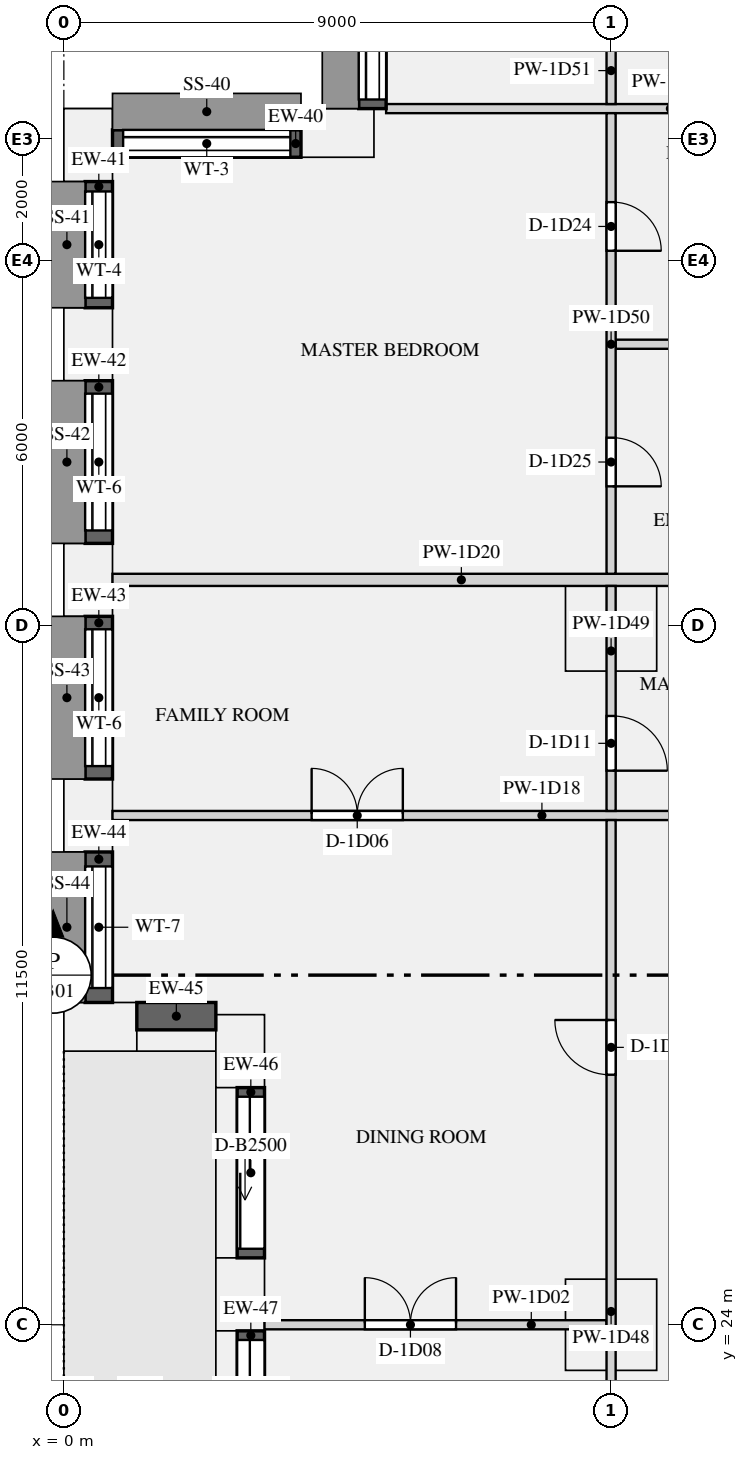
"""IFC4 building model, lengths in metres.
Left out: names, types, materials, properties, quantities, classifications, styles, units other than length and angle.
Written with IfcOpenShell. Run it as: python <this file> out.ifc"""

import sys

from ifc_helpers import new_model, si_unit, direction, frame, frame_2d, origin, origin_2d, place, context, subcontext, project, spatial, rectangle, extrude, element, fill, save


model = new_model("IFC4")
c1 = context("Model", 3, precision=1e-05, world=origin(), true_north=direction((0.0, 1.0)))
c2 = subcontext(c1, "Body", "Model", "MODEL_VIEW")
j1 = project(units=[si_unit("LENGTHUNIT", "METRE"), si_unit("PLANEANGLEUNIT", "RADIAN")], contexts=[c1])
p1 = place(None, origin())
s1 = spatial("IfcSite", under=j1, at=p1, CompositionType="ELEMENT")
p2 = place(p1, origin())
s2 = spatial("IfcBuilding", under=s1, at=p2, CompositionType="ELEMENT")
p3 = place(p2, frame((0.0, 0.0, 47.85)))
s3 = spatial("IfcBuildingStorey", under=s2, at=p3, CompositionType="ELEMENT", Elevation=47.85)
for number, where, z_axis, x_axis in (
    (1, (4.5, 43.6, 0.0), (0.0, 0.0, 1.0), (-1.0, 0.0, 0.0)),
    (2, (0.4, 43.4, 0.0), (0.0, 0.0, 1.0), (0.0, -1.0, 0.0)),
    (3, (0.4, 40.125, 0.0), (0.0, 0.0, 1.0), (0.0, -1.0, 0.0)),
    (4, (0.4, 36.25, 0.0), (0.0, 0.0, 1.0), (0.0, -1.0, 0.0)),
    (5, (0.4, 32.375, 0.0), (0.0, 0.0, 1.0), (0.0, -1.0, 0.0)),
    (6, (0.6, 28.9, 0.0), (0.0, 0.0, 1.0), (1.0, 0.0, 0.0)),
    (7, (2.9, 28.5, 0.0), (0.0, 0.0, 1.0), (0.0, -1.0, 0.0)),
    (8, (2.9, 24.5, 0.0), (0.0, 0.0, 1.0), (0.0, -1.0, 0.0)),
):
    element("IfcColumn", number, at=place(p3, frame(where, z_axis=z_axis, x_axis=x_axis)), inside=s3, PredefinedType="USERDEFINED", context=c2, shape_type="SweptSolid", body=[
        extrude(rectangle(XDim=1.2, YDim=0.8, at=origin_2d()), origin(), (0.0, 0.0, 1.0), 3.15),
    ])
for number, where, z_axis, x_axis in (
    (9, (9.0, 24.0, 0.0), (0.0, 0.0, 1.0), (1.0, 0.0, 0.0)),
    (10, (9.0, 35.5, 0.0), (0.0, 0.0, 1.0), (1.0, 0.0, 0.0)),
):
    element("IfcColumn", number, at=place(p3, frame(where, z_axis=z_axis, x_axis=x_axis)), inside=s3, PredefinedType="COLUMN", context=c2, shape_type="SweptSolid", body=[
        extrude(rectangle(XDim=1.5, YDim=1.5, at=origin_2d()), origin(), (0.0, 0.0, 1.0), 3.15),
    ])
p4 = place(p3, frame((5.075, 47.3, 0.9), z_axis=(0.0, 0.0, 1.0), x_axis=(0.0, -1.0, 0.0)))
e11 = element("IfcWall", 11, at=p4, inside=s3, PredefinedType="SOLIDWALL", context=c2, shape_type="SweptSolid", body=[
    extrude(rectangle(XDim=3.3, YDim=0.45, at=frame_2d((1.65, 0.0))), origin(), (0.0, 0.0, 1.0), 1.93),
])
p5 = place(p4, frame((0.15, 0.0, 0.15)))
e12 = element("IfcOpeningElement", 12, at=p5, cuts=e11, PredefinedType="OPENING", context=c2, shape_type="SweptSolid", body=[
    extrude(rectangle(XDim=3.0, YDim=1.5, at=frame_2d((1.5, 0.75))), frame((0.0, 0.235, 0.0), z_axis=(0.0, -1.0, 0.0), x_axis=(1.0, 0.0, 0.0)), (0.0, 0.0, 1.0), 0.47),
])
p6 = place(p3, frame((3.9, 43.425, 0.9), z_axis=(0.0, 0.0, 1.0), x_axis=(-1.0, 0.0, 0.0)))
e13 = element("IfcWall", 13, at=p6, inside=s3, PredefinedType="SOLIDWALL", context=c2, shape_type="SweptSolid", body=[
    extrude(rectangle(XDim=3.1, YDim=0.45, at=frame_2d((1.55, 0.0))), origin(), (0.0, 0.0, 1.0), 1.93),
])
p7 = place(p6, frame((0.175, 0.0, 0.15)))
e14 = element("IfcOpeningElement", 14, at=p7, cuts=e13, PredefinedType="OPENING", context=c2, shape_type="SweptSolid", body=[
    extrude(rectangle(XDim=2.75, YDim=1.5, at=frame_2d((1.375, 0.75))), frame((0.0, 0.235, 0.0), z_axis=(0.0, -1.0, 0.0), x_axis=(1.0, 0.0, 0.0)), (0.0, 0.0, 1.0), 0.47),
])
p8 = place(p3, frame((0.575, 42.8, 0.9), z_axis=(0.0, 0.0, 1.0), x_axis=(0.0, -1.0, 0.0)))
e15 = element("IfcWall", 15, at=p8, inside=s3, PredefinedType="SOLIDWALL", context=c2, shape_type="SweptSolid", body=[
    extrude(rectangle(XDim=2.075, YDim=0.45, at=frame_2d((1.038, 0.0))), origin(), (0.0, 0.0, 1.0), 1.93),
])
p9 = place(p8, frame((0.163, 0.0, 0.15)))
e16 = element("IfcOpeningElement", 16, at=p9, cuts=e15, PredefinedType="OPENING", context=c2, shape_type="SweptSolid", body=[
    extrude(rectangle(XDim=1.75, YDim=1.5, at=frame_2d((0.875, 0.75))), frame((0.0, 0.235, 0.0), z_axis=(0.0, -1.0, 0.0), x_axis=(1.0, 0.0, 0.0)), (0.0, 0.0, 1.0), 0.47),
])
p10 = place(p3, frame((0.575, 39.525, 0.9), z_axis=(0.0, 0.0, 1.0), x_axis=(0.0, -1.0, 0.0)))
e17 = element("IfcWall", 17, at=p10, inside=s3, PredefinedType="SOLIDWALL", context=c2, shape_type="SweptSolid", body=[
    extrude(rectangle(XDim=2.675, YDim=0.45, at=frame_2d((1.337, 0.0))), origin(), (0.0, 0.0, 1.0), 1.93),
])
p11 = place(p10, frame((0.212, 0.0, 0.15)))
e18 = element("IfcOpeningElement", 18, at=p11, cuts=e17, PredefinedType="OPENING", context=c2, shape_type="SweptSolid", body=[
    extrude(rectangle(XDim=2.25, YDim=1.5, at=frame_2d((1.125, 0.75))), frame((0.0, 0.235, 0.0), z_axis=(0.0, -1.0, 0.0), x_axis=(1.0, 0.0, 0.0)), (0.0, 0.0, 1.0), 0.47),
])
p12 = place(p3, frame((0.575, 35.65, 0.9), z_axis=(0.0, 0.0, 1.0), x_axis=(0.0, -1.0, 0.0)))
e19 = element("IfcWall", 19, at=p12, inside=s3, PredefinedType="SOLIDWALL", context=c2, shape_type="SweptSolid", body=[
    extrude(rectangle(XDim=2.675, YDim=0.45, at=frame_2d((1.337, 0.0))), origin(), (0.0, 0.0, 1.0), 1.93),
])
p13 = place(p12, frame((0.212, 0.0, 0.15)))
e20 = element("IfcOpeningElement", 20, at=p13, cuts=e19, PredefinedType="OPENING", context=c2, shape_type="SweptSolid", body=[
    extrude(rectangle(XDim=2.25, YDim=1.5, at=frame_2d((1.125, 0.75))), frame((0.0, 0.235, 0.0), z_axis=(0.0, -1.0, 0.0), x_axis=(1.0, 0.0, 0.0)), (0.0, 0.0, 1.0), 0.47),
])
p14 = place(p3, frame((0.575, 31.775, 0.9), z_axis=(0.0, 0.0, 1.0), x_axis=(0.0, -1.0, 0.0)))
e21 = element("IfcWall", 21, at=p14, inside=s3, PredefinedType="SOLIDWALL", context=c2, shape_type="SweptSolid", body=[
    extrude(rectangle(XDim=2.475, YDim=0.45, at=frame_2d((1.237, 0.0))), origin(), (0.0, 0.0, 1.0), 1.93),
])
p15 = place(p14, frame((0.238, 0.0, 0.15)))
e22 = element("IfcOpeningElement", 22, at=p15, cuts=e21, PredefinedType="OPENING", context=c2, shape_type="SweptSolid", body=[
    extrude(rectangle(XDim=2.0, YDim=1.5, at=frame_2d((1.0, 0.75))), frame((0.0, 0.235, 0.0), z_axis=(0.0, -1.0, 0.0), x_axis=(1.0, 0.0, 0.0)), (0.0, 0.0, 1.0), 0.47),
])
p16 = place(p3, frame((1.2, 29.075, 0.9), z_axis=(0.0, 0.0, 1.0), x_axis=(1.0, 0.0, 0.0)))
e23 = element("IfcWall", 23, at=p16, inside=s3, PredefinedType="SOLIDWALL", context=c2, shape_type="SweptSolid", body=[
    extrude(rectangle(XDim=1.3, YDim=0.45, at=frame_2d((0.65, 0.0))), origin(), (0.0, 0.0, 1.0), 1.93),
])
p17 = place(p3, frame((3.075, 27.9, 0.0), z_axis=(0.0, 0.0, 1.0), x_axis=(0.0, -1.0, 0.0)))
e24 = element("IfcWall", 24, at=p17, inside=s3, PredefinedType="SOLIDWALL", context=c2, shape_type="SweptSolid", body=[
    extrude(rectangle(XDim=2.8, YDim=0.45, at=frame_2d((1.4, 0.0))), origin(), (0.0, 0.0, 1.0), 2.83),
])
p18 = place(p17, frame((0.15, 0.0, 0.0)))
e25 = element("IfcOpeningElement", 25, at=p18, cuts=e24, PredefinedType="OPENING", context=c2, shape_type="SweptSolid", body=[
    extrude(rectangle(XDim=2.5, YDim=2.3, at=frame_2d((1.25, 1.15))), frame((0.0, 0.235, 0.0), z_axis=(0.0, -1.0, 0.0), x_axis=(1.0, 0.0, 0.0)), (0.0, 0.0, 1.0), 0.47),
])
p19 = place(p3, frame((3.075, 23.9, 0.0), z_axis=(0.0, 0.0, 1.0), x_axis=(0.0, -1.0, 0.0)))
e26 = element("IfcWall", 26, at=p19, inside=s3, PredefinedType="SOLIDWALL", context=c2, shape_type="SweptSolid", body=[
    extrude(rectangle(XDim=2.8, YDim=0.45, at=frame_2d((1.4, 0.0))), origin(), (0.0, 0.0, 1.0), 2.83),
])
p20 = place(p19, frame((0.15, 0.0, 0.0)))
e27 = element("IfcOpeningElement", 27, at=p20, cuts=e26, PredefinedType="OPENING", context=c2, shape_type="SweptSolid", body=[
    extrude(rectangle(XDim=2.5, YDim=2.3, at=frame_2d((1.25, 1.15))), frame((0.0, 0.235, 0.0), z_axis=(0.0, -1.0, 0.0), x_axis=(1.0, 0.0, 0.0)), (0.0, 0.0, 1.0), 0.47),
])
p21 = place(p3, frame((3.3, 24.0, 0.0), z_axis=(0.0, 0.0, 1.0), x_axis=(1.0, 0.0, 0.0)))
e28 = element("IfcWall", 28, at=p21, inside=s3, PredefinedType="PARTITIONING", context=c2, shape_type="SweptSolid", body=[
    extrude(rectangle(XDim=5.625, YDim=0.15, at=frame_2d((2.812, 0.0))), origin(), (0.0, 0.0, 1.0), 2.83),
])
p22 = place(p21, frame((1.65, 0.0, 0.0)))
e29 = element("IfcOpeningElement", 29, at=p22, cuts=e28, PredefinedType="OPENING", context=c2, shape_type="SweptSolid", body=[
    extrude(rectangle(XDim=1.5, YDim=2.1, at=frame_2d((0.75, 1.05))), frame((0.0, 0.085, 0.0), z_axis=(0.0, -1.0, 0.0), x_axis=(1.0, 0.0, 0.0)), (0.0, 0.0, 1.0), 0.17),
])
p23 = place(p3, frame((0.8, 32.375, 0.0), z_axis=(0.0, 0.0, 1.0), x_axis=(1.0, 0.0, 0.0)))
e30 = element("IfcWall", 30, at=p23, inside=s3, PredefinedType="PARTITIONING", context=c2, shape_type="SweptSolid", body=[
    extrude(rectangle(XDim=11.4, YDim=0.15, at=frame_2d((5.7, 0.0))), origin(), (0.0, 0.0, 1.0), 2.83),
])
p24 = place(p23, frame((3.275, 0.0, 0.0)))
e31 = element("IfcOpeningElement", 31, at=p24, cuts=e30, PredefinedType="OPENING", context=c2, shape_type="SweptSolid", body=[
    extrude(rectangle(XDim=1.5, YDim=2.1, at=frame_2d((0.75, 1.05))), frame((0.0, 0.085, 0.0), z_axis=(0.0, -1.0, 0.0), x_axis=(1.0, 0.0, 0.0)), (0.0, 0.0, 1.0), 0.17),
])
p25 = place(p23, frame((9.35, 0.0, 0.0)))
e32 = element("IfcOpeningElement", 32, at=p25, cuts=e30, PredefinedType="OPENING", context=c2, shape_type="SweptSolid", body=[
    extrude(rectangle(XDim=0.9, YDim=2.1, at=frame_2d((0.45, 1.05))), frame((0.0, 0.085, 0.0), z_axis=(0.0, -1.0, 0.0), x_axis=(1.0, 0.0, 0.0)), (0.0, 0.0, 1.0), 0.17),
])
p26 = place(p3, frame((0.8, 36.25, 0.0), z_axis=(0.0, 0.0, 1.0), x_axis=(1.0, 0.0, 0.0)))
e33 = element("IfcWall", 33, at=p26, inside=s3, PredefinedType="PARTITIONING", context=c2, shape_type="SweptSolid", body=[
    extrude(rectangle(XDim=11.475, YDim=0.2, at=frame_2d((5.737, 0.0))), origin(), (0.0, 0.0, 1.0), 2.83),
])
p27 = place(p3, frame((5.3, 44.0, 0.0), z_axis=(0.0, 0.0, 1.0), x_axis=(1.0, 0.0, 0.0)))
e34 = element("IfcWall", 34, at=p27, inside=s3, PredefinedType="PARTITIONING", context=c2, shape_type="SweptSolid", body=[
    extrude(rectangle(XDim=27.775, YDim=0.15, at=frame_2d((13.887, 0.0))), origin(), (0.0, 0.0, 1.0), 2.83),
])
p28 = place(p27, frame((14.5, 0.0, 0.0)))
e35 = element("IfcOpeningElement", 35, at=p28, cuts=e34, PredefinedType="OPENING", context=c2, shape_type="SweptSolid", body=[
    extrude(rectangle(XDim=0.9, YDim=2.1, at=frame_2d((0.45, 1.05))), frame((0.0, 0.085, 0.0), z_axis=(0.0, -1.0, 0.0), x_axis=(1.0, 0.0, 0.0)), (0.0, 0.0, 1.0), 0.17),
])
p29 = place(p27, frame((19.0, 0.0, 0.0)))
e36 = element("IfcOpeningElement", 36, at=p29, cuts=e34, PredefinedType="OPENING", context=c2, shape_type="SweptSolid", body=[
    extrude(rectangle(XDim=0.9, YDim=2.1, at=frame_2d((0.45, 1.05))), frame((0.0, 0.085, 0.0), z_axis=(0.0, -1.0, 0.0), x_axis=(1.0, 0.0, 0.0)), (0.0, 0.0, 1.0), 0.17),
])
p30 = place(p27, frame((9.35, 0.0, 0.0)))
e37 = element("IfcOpeningElement", 37, at=p30, cuts=e34, PredefinedType="OPENING", context=c2, shape_type="SweptSolid", body=[
    extrude(rectangle(XDim=0.9, YDim=2.1, at=frame_2d((0.45, 1.05))), frame((0.0, 0.085, 0.0), z_axis=(0.0, -1.0, 0.0), x_axis=(1.0, 0.0, 0.0)), (0.0, 0.0, 1.0), 0.17),
])
p31 = place(p27, frame((23.5, 0.0, 0.0)))
e38 = element("IfcOpeningElement", 38, at=p31, cuts=e34, PredefinedType="OPENING", context=c2, shape_type="SweptSolid", body=[
    extrude(rectangle(XDim=0.9, YDim=2.1, at=frame_2d((0.45, 1.05))), frame((0.0, 0.085, 0.0), z_axis=(0.0, -1.0, 0.0), x_axis=(1.0, 0.0, 0.0)), (0.0, 0.0, 1.0), 0.17),
])
p32 = place(p3, frame((9.075, 40.125, 0.0), z_axis=(0.0, 0.0, 1.0), x_axis=(1.0, 0.0, 0.0)))
e39 = element("IfcWall", 39, at=p32, inside=s3, PredefinedType="PARTITIONING", context=c2, shape_type="SweptSolid", body=[
    extrude(rectangle(XDim=3.05, YDim=0.15, at=frame_2d((1.525, 0.0))), origin(), (0.0, 0.0, 1.0), 2.83),
])
p33 = place(p32, frame((1.125, 0.0, 0.0)))
e40 = element("IfcOpeningElement", 40, at=p33, cuts=e39, PredefinedType="OPENING", context=c2, shape_type="SweptSolid", body=[
    extrude(rectangle(XDim=0.8, YDim=2.1, at=frame_2d((0.4, 1.05))), frame((0.0, 0.085, 0.0), z_axis=(0.0, -1.0, 0.0), x_axis=(1.0, 0.0, 0.0)), (0.0, 0.0, 1.0), 0.17),
])
p34 = place(p3, frame((9.0, 12.575, 0.0), z_axis=(0.0, 0.0, 1.0), x_axis=(0.0, 1.0, 0.0)))
e41 = element("IfcWall", 41, at=p34, inside=s3, PredefinedType="PARTITIONING", context=c2, shape_type="SweptSolid", body=[
    extrude(rectangle(XDim=19.725, YDim=0.15, at=frame_2d((9.863, 0.0))), origin(), (0.0, 0.0, 1.0), 2.83),
])
p35 = place(p34, frame((15.537, 0.0, 0.0)))
e42 = element("IfcOpeningElement", 42, at=p35, cuts=e41, PredefinedType="OPENING", context=c2, shape_type="SweptSolid", body=[
    extrude(rectangle(XDim=0.9, YDim=2.1, at=frame_2d((0.45, 1.05))), frame((0.0, 0.085, 0.0), z_axis=(0.0, -1.0, 0.0), x_axis=(1.0, 0.0, 0.0)), (0.0, 0.0, 1.0), 0.17),
])
p36 = place(p34, frame((6.85, 0.0, 0.0)))
e43 = element("IfcOpeningElement", 43, at=p36, cuts=e41, PredefinedType="OPENING", context=c2, shape_type="SweptSolid", body=[
    extrude(rectangle(XDim=0.9, YDim=2.1, at=frame_2d((0.45, 1.05))), frame((0.0, 0.085, 0.0), z_axis=(0.0, -1.0, 0.0), x_axis=(1.0, 0.0, 0.0)), (0.0, 0.0, 1.0), 0.17),
])
p37 = place(p3, frame((9.0, 32.45, 0.0), z_axis=(0.0, 0.0, 1.0), x_axis=(0.0, 1.0, 0.0)))
e44 = element("IfcWall", 44, at=p37, inside=s3, PredefinedType="PARTITIONING", context=c2, shape_type="SweptSolid", body=[
    extrude(rectangle(XDim=3.7, YDim=0.15, at=frame_2d((1.85, 0.0))), origin(), (0.0, 0.0, 1.0), 2.83),
])
p38 = place(p37, frame((0.662, 0.0, 0.0)))
e45 = element("IfcOpeningElement", 45, at=p38, cuts=e44, PredefinedType="OPENING", context=c2, shape_type="SweptSolid", body=[
    extrude(rectangle(XDim=0.9, YDim=2.1, at=frame_2d((0.45, 1.05))), frame((0.0, 0.085, 0.0), z_axis=(0.0, -1.0, 0.0), x_axis=(1.0, 0.0, 0.0)), (0.0, 0.0, 1.0), 0.17),
])
p39 = place(p3, frame((9.0, 36.35, 0.0), z_axis=(0.0, 0.0, 1.0), x_axis=(0.0, 1.0, 0.0)))
e46 = element("IfcWall", 46, at=p39, inside=s3, PredefinedType="PARTITIONING", context=c2, shape_type="SweptSolid", body=[
    extrude(rectangle(XDim=7.575, YDim=0.15, at=frame_2d((3.788, 0.0))), origin(), (0.0, 0.0, 1.0), 2.83),
])
p40 = place(p39, frame((5.312, 0.0, 0.0)))
e47 = element("IfcOpeningElement", 47, at=p40, cuts=e46, PredefinedType="OPENING", context=c2, shape_type="SweptSolid", body=[
    extrude(rectangle(XDim=0.8, YDim=2.1, at=frame_2d((0.4, 1.05))), frame((0.0, 0.085, 0.0), z_axis=(0.0, -1.0, 0.0), x_axis=(1.0, 0.0, 0.0)), (0.0, 0.0, 1.0), 0.17),
])
p41 = place(p39, frame((1.438, 0.0, 0.0)))
e48 = element("IfcOpeningElement", 48, at=p41, cuts=e46, PredefinedType="OPENING", context=c2, shape_type="SweptSolid", body=[
    extrude(rectangle(XDim=0.8, YDim=2.1, at=frame_2d((0.4, 1.05))), frame((0.0, 0.085, 0.0), z_axis=(0.0, -1.0, 0.0), x_axis=(1.0, 0.0, 0.0)), (0.0, 0.0, 1.0), 0.17),
])
p42 = place(p3, frame((9.0, 44.075, 0.0), z_axis=(0.0, 0.0, 1.0), x_axis=(0.0, 1.0, 0.0)))
e49 = element("IfcWall", 49, at=p42, inside=s3, PredefinedType="PARTITIONING", context=c2, shape_type="SweptSolid", body=[
    extrude(rectangle(XDim=3.625, YDim=0.15, at=frame_2d((1.812, 0.0))), origin(), (0.0, 0.0, 1.0), 2.83),
])
p43 = place(p42, frame((1.1, 0.0, 0.0)))
e50 = element("IfcOpeningElement", 50, at=p43, cuts=e49, PredefinedType="OPENING", context=c2, shape_type="SweptSolid", body=[
    extrude(rectangle(XDim=1.5, YDim=2.1, at=frame_2d((0.75, 1.05))), frame((0.0, 0.085, 0.0), z_axis=(0.0, -1.0, 0.0), x_axis=(1.0, 0.0, 0.0)), (0.0, 0.0, 1.0), 0.17),
])
p44 = place(p5, origin())
e51 = element("IfcWindow", 51, at=p44, inside=s3, PartitioningType="SINGLE_PANEL", PredefinedType="WINDOW", context=c2, shape_type="SweptSolid", body=[
    extrude(rectangle(XDim=3.0, YDim=1.5, at=frame_2d((1.5, 0.75))), frame((0.0, -0.065, 0.0), z_axis=(0.0, -1.0, 0.0), x_axis=(1.0, 0.0, 0.0)), (0.0, 0.0, 1.0), 0.06),
])
fill(e12, e51)
p45 = place(p7, origin())
e52 = element("IfcWindow", 52, at=p45, inside=s3, PartitioningType="SINGLE_PANEL", PredefinedType="WINDOW", context=c2, shape_type="SweptSolid", body=[
    extrude(rectangle(XDim=2.75, YDim=1.5, at=frame_2d((1.375, 0.75))), frame((0.0, -0.065, 0.0), z_axis=(0.0, -1.0, 0.0), x_axis=(1.0, 0.0, 0.0)), (0.0, 0.0, 1.0), 0.06),
])
fill(e14, e52)
p46 = place(p9, origin())
e53 = element("IfcWindow", 53, at=p46, inside=s3, PartitioningType="SINGLE_PANEL", PredefinedType="WINDOW", context=c2, shape_type="SweptSolid", body=[
    extrude(rectangle(XDim=1.75, YDim=1.5, at=frame_2d((0.875, 0.75))), frame((0.0, -0.065, 0.0), z_axis=(0.0, -1.0, 0.0), x_axis=(1.0, 0.0, 0.0)), (0.0, 0.0, 1.0), 0.06),
])
fill(e16, e53)
p47 = place(p11, origin())
e54 = element("IfcWindow", 54, at=p47, inside=s3, PartitioningType="SINGLE_PANEL", PredefinedType="WINDOW", context=c2, shape_type="SweptSolid", body=[
    extrude(rectangle(XDim=2.25, YDim=1.5, at=frame_2d((1.125, 0.75))), frame((0.0, -0.065, 0.0), z_axis=(0.0, -1.0, 0.0), x_axis=(1.0, 0.0, 0.0)), (0.0, 0.0, 1.0), 0.06),
])
fill(e18, e54)
p48 = place(p13, origin())
e55 = element("IfcWindow", 55, at=p48, inside=s3, PartitioningType="SINGLE_PANEL", PredefinedType="WINDOW", context=c2, shape_type="SweptSolid", body=[
    extrude(rectangle(XDim=2.25, YDim=1.5, at=frame_2d((1.125, 0.75))), frame((0.0, -0.065, 0.0), z_axis=(0.0, -1.0, 0.0), x_axis=(1.0, 0.0, 0.0)), (0.0, 0.0, 1.0), 0.06),
])
fill(e20, e55)
p49 = place(p15, origin())
e56 = element("IfcWindow", 56, at=p49, inside=s3, PartitioningType="SINGLE_PANEL", PredefinedType="WINDOW", context=c2, shape_type="SweptSolid", body=[
    extrude(rectangle(XDim=2.0, YDim=1.5, at=frame_2d((1.0, 0.75))), frame((0.0, -0.065, 0.0), z_axis=(0.0, -1.0, 0.0), x_axis=(1.0, 0.0, 0.0)), (0.0, 0.0, 1.0), 0.06),
])
fill(e22, e56)
p50 = place(p18, origin())
e57 = element("IfcDoor", 57, at=p50, inside=s3, OperationType="SLIDING_TO_LEFT", PredefinedType="DOOR", context=c2, shape_type="SweptSolid", body=[
    extrude(rectangle(XDim=2.5, YDim=2.3, at=frame_2d((1.25, 1.15))), frame((0.0, -0.07, 0.0), z_axis=(0.0, -1.0, 0.0), x_axis=(1.0, 0.0, 0.0)), (0.0, 0.0, 1.0), 0.05),
])
fill(e25, e57)
p51 = place(p20, origin())
e58 = element("IfcDoor", 58, at=p51, inside=s3, OperationType="SLIDING_TO_LEFT", PredefinedType="DOOR", context=c2, shape_type="SweptSolid", body=[
    extrude(rectangle(XDim=2.5, YDim=2.3, at=frame_2d((1.25, 1.15))), frame((0.0, -0.07, 0.0), z_axis=(0.0, -1.0, 0.0), x_axis=(1.0, 0.0, 0.0)), (0.0, 0.0, 1.0), 0.05),
])
fill(e27, e58)
p52 = place(p24, origin())
e59 = element("IfcDoor", 59, at=p52, inside=s3, OperationType="DOUBLE_DOOR_SINGLE_SWING", PredefinedType="DOOR", context=c2, shape_type="SweptSolid", body=[
    extrude(rectangle(XDim=1.5, YDim=2.1, at=frame_2d((0.75, 1.05))), frame((0.0, 0.025, 0.0), z_axis=(0.0, -1.0, 0.0), x_axis=(1.0, 0.0, 0.0)), (0.0, 0.0, 1.0), 0.05),
])
fill(e31, e59)
p53 = place(p35, origin())
e60 = element("IfcDoor", 60, at=p53, inside=s3, OperationType="SINGLE_SWING_RIGHT", PredefinedType="DOOR", context=c2, shape_type="SweptSolid", body=[
    extrude(rectangle(XDim=0.9, YDim=2.1, at=frame_2d((0.45, 1.05))), frame((0.0, 0.025, 0.0), z_axis=(0.0, -1.0, 0.0), x_axis=(1.0, 0.0, 0.0)), (0.0, 0.0, 1.0), 0.05),
])
fill(e42, e60)
p54 = place(p22, origin())
e61 = element("IfcDoor", 61, at=p54, inside=s3, OperationType="DOUBLE_DOOR_SINGLE_SWING", PredefinedType="DOOR", context=c2, shape_type="SweptSolid", body=[
    extrude(rectangle(XDim=1.5, YDim=2.1, at=frame_2d((0.75, 1.05))), frame((0.0, 0.025, 0.0), z_axis=(0.0, -1.0, 0.0), x_axis=(1.0, 0.0, 0.0)), (0.0, 0.0, 1.0), 0.05),
])
fill(e29, e61)
p55 = place(p38, frame((0.9, 0.0, 0.0), z_axis=(0.0, 0.0, 1.0), x_axis=(-1.0, 0.0, 0.0)))
e62 = element("IfcDoor", 62, at=p55, inside=s3, OperationType="SINGLE_SWING_RIGHT", PredefinedType="DOOR", context=c2, shape_type="SweptSolid", body=[
    extrude(rectangle(XDim=0.9, YDim=2.1, at=frame_2d((0.45, 1.05))), frame((0.0, 0.025, 0.0), z_axis=(0.0, -1.0, 0.0), x_axis=(1.0, 0.0, 0.0)), (0.0, 0.0, 1.0), 0.05),
])
fill(e45, e62)
p56 = place(p40, frame((0.8, 0.0, 0.0), z_axis=(0.0, 0.0, 1.0), x_axis=(-1.0, 0.0, 0.0)))
e63 = element("IfcDoor", 63, at=p56, inside=s3, OperationType="SINGLE_SWING_RIGHT", PredefinedType="DOOR", context=c2, shape_type="SweptSolid", body=[
    extrude(rectangle(XDim=0.8, YDim=2.1, at=frame_2d((0.4, 1.05))), frame((0.0, 0.025, 0.0), z_axis=(0.0, -1.0, 0.0), x_axis=(1.0, 0.0, 0.0)), (0.0, 0.0, 1.0), 0.05),
])
fill(e47, e63)
p57 = place(p41, frame((0.8, 0.0, 0.0), z_axis=(0.0, 0.0, 1.0), x_axis=(-1.0, 0.0, 0.0)))
e64 = element("IfcDoor", 64, at=p57, inside=s3, OperationType="SINGLE_SWING_RIGHT", PredefinedType="DOOR", context=c2, shape_type="SweptSolid", body=[
    extrude(rectangle(XDim=0.8, YDim=2.1, at=frame_2d((0.4, 1.05))), frame((0.0, 0.025, 0.0), z_axis=(0.0, -1.0, 0.0), x_axis=(1.0, 0.0, 0.0)), (0.0, 0.0, 1.0), 0.05),
])
fill(e48, e64)
save(model, sys.argv[1])
